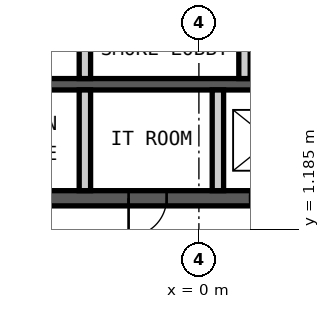
"""IFC4 building model, lengths in metres.
Left out: names, types, materials, properties, quantities, classifications, styles, units other than length and angle.
Written with IfcOpenShell. Run it as: python <this file> out.ifc"""

import sys

from ifc_helpers import new_model, si_unit, direction, frame, frame_2d, origin, place, context, subcontext, project, spatial, rectangle, extrude, element, fill, save


model = new_model("IFC4")
c1 = context("Model", 3, precision=1e-05, world=origin(), true_north=direction((0.0, 1.0)))
c2 = subcontext(c1, "Body", "Model", "MODEL_VIEW")
j1 = project(units=[si_unit("LENGTHUNIT", "METRE"), si_unit("PLANEANGLEUNIT", "RADIAN")], contexts=[c1])
p1 = place(None, origin())
s1 = spatial("IfcSite", under=j1, at=p1, CompositionType="ELEMENT")
p2 = place(p1, origin())
s2 = spatial("IfcBuilding", under=s1, at=p2, CompositionType="ELEMENT")
p3 = place(p2, frame((0.0, 0.0, 145.0)))
s3 = spatial("IfcBuildingStorey", under=s2, at=p3, CompositionType="ELEMENT", Elevation=145.0)
p4 = place(p3, frame((-12.0, 5.0, 0.0), z_axis=(0.0, 0.0, 1.0), x_axis=(1.0, 0.0, 0.0)))
e1 = element("IfcWall", 1, at=p4, inside=s3, PredefinedType="SHEAR", context=c2, shape_type="SweptSolid", body=[
    extrude(rectangle(XDim=24.0, YDim=0.3, at=frame_2d((12.0, 0.0))), origin(), (0.0, 0.0, 1.0), 4.2),
])
p5 = place(p3, frame((-12.0, 2.0, 0.0), z_axis=(0.0, 0.0, 1.0), x_axis=(1.0, 0.0, 0.0)))
e2 = element("IfcWall", 2, at=p5, inside=s3, PredefinedType="SHEAR", context=c2, shape_type="SweptSolid", body=[
    extrude(rectangle(XDim=24.0, YDim=0.4, at=frame_2d((12.0, 0.0))), origin(), (0.0, 0.0, 1.0), 4.2),
])
p6 = place(p5, frame((2.4, 0.0, 0.0)))
e3 = element("IfcOpeningElement", 3, at=p6, cuts=e2, PredefinedType="OPENING", context=c2, shape_type="SweptSolid", body=[
    extrude(rectangle(XDim=1.1, YDim=2.1, at=frame_2d((0.55, 1.05))), frame((0.0, 0.21, 0.0), z_axis=(0.0, -1.0, 0.0), x_axis=(1.0, 0.0, 0.0)), (0.0, 0.0, 1.0), 0.42),
])
p7 = place(p5, frame((22.0, 0.0, 0.0)))
e4 = element("IfcOpeningElement", 4, at=p7, cuts=e2, PredefinedType="OPENING", context=c2, shape_type="SweptSolid", body=[
    extrude(rectangle(XDim=1.1, YDim=2.1, at=frame_2d((0.55, 1.05))), frame((0.0, 0.21, 0.0), z_axis=(0.0, -1.0, 0.0), x_axis=(1.0, 0.0, 0.0)), (0.0, 0.0, 1.0), 0.42),
])
p8 = place(p5, frame((10.15, 0.0, 0.0)))
e5 = element("IfcOpeningElement", 5, at=p8, cuts=e2, PredefinedType="OPENING", context=c2, shape_type="SweptSolid", body=[
    extrude(rectangle(XDim=1.0, YDim=2.1, at=frame_2d((0.5, 1.05))), frame((0.0, 0.21, 0.0), z_axis=(0.0, -1.0, 0.0), x_axis=(1.0, 0.0, 0.0)), (0.0, 0.0, 1.0), 0.42),
])
p9 = place(p5, frame((6.9, 0.0, 0.0)))
e6 = element("IfcOpeningElement", 6, at=p9, cuts=e2, PredefinedType="OPENING", context=c2, shape_type="SweptSolid", body=[
    extrude(rectangle(XDim=1.0, YDim=2.1, at=frame_2d((0.5, 1.05))), frame((0.0, 0.21, 0.0), z_axis=(0.0, -1.0, 0.0), x_axis=(1.0, 0.0, 0.0)), (0.0, 0.0, 1.0), 0.42),
])
p10 = place(p5, frame((13.35, 0.0, 0.0)))
e7 = element("IfcOpeningElement", 7, at=p10, cuts=e2, PredefinedType="OPENING", context=c2, shape_type="SweptSolid", body=[
    extrude(rectangle(XDim=1.1, YDim=2.4, at=frame_2d((0.55, 1.2))), frame((0.0, 0.21, 0.0), z_axis=(0.0, -1.0, 0.0), x_axis=(1.0, 0.0, 0.0)), (0.0, 0.0, 1.0), 0.42),
])
p11 = place(p5, frame((16.15, 0.0, 0.0)))
e8 = element("IfcOpeningElement", 8, at=p11, cuts=e2, PredefinedType="OPENING", context=c2, shape_type="SweptSolid", body=[
    extrude(rectangle(XDim=1.1, YDim=2.4, at=frame_2d((0.55, 1.2))), frame((0.0, 0.21, 0.0), z_axis=(0.0, -1.0, 0.0), x_axis=(1.0, 0.0, 0.0)), (0.0, 0.0, 1.0), 0.42),
])
p12 = place(p5, frame((18.95, 0.0, 0.0)))
e9 = element("IfcOpeningElement", 9, at=p12, cuts=e2, PredefinedType="OPENING", context=c2, shape_type="SweptSolid", body=[
    extrude(rectangle(XDim=1.1, YDim=2.4, at=frame_2d((0.55, 1.2))), frame((0.0, 0.21, 0.0), z_axis=(0.0, -1.0, 0.0), x_axis=(1.0, 0.0, 0.0)), (0.0, 0.0, 1.0), 0.42),
])
p13 = place(p3, frame((-3.0, 5.15, 0.0), z_axis=(0.0, 0.0, 1.0), x_axis=(0.0, 1.0, 0.0)))
e10 = element("IfcWall", 10, at=p13, inside=s3, PredefinedType="PARTITIONING", context=c2, shape_type="SweptSolid", body=[
    extrude(rectangle(XDim=3.85, YDim=0.3, at=frame_2d((1.925, 0.0))), origin(), (0.0, 0.0, 1.0), 3.98),
])
p14 = place(p13, frame((1.425, 0.0, 0.0)))
e11 = element("IfcOpeningElement", 11, at=p14, cuts=e10, PredefinedType="OPENING", context=c2, shape_type="SweptSolid", body=[
    extrude(rectangle(XDim=1.0, YDim=2.1, at=frame_2d((0.5, 1.05))), frame((0.0, 0.16, 0.0), z_axis=(0.0, -1.0, 0.0), x_axis=(1.0, 0.0, 0.0)), (0.0, 0.0, 1.0), 0.32),
])
p15 = place(p3, frame((1.2, 5.15, 0.0), z_axis=(0.0, 0.0, 1.0), x_axis=(0.0, 1.0, 0.0)))
e12 = element("IfcWall", 12, at=p15, inside=s3, PredefinedType="PARTITIONING", context=c2, shape_type="SweptSolid", body=[
    extrude(rectangle(XDim=3.85, YDim=0.3, at=frame_2d((1.925, 0.0))), origin(), (0.0, 0.0, 1.0), 3.98),
])
p16 = place(p15, frame((1.375, 0.0, 0.0)))
e13 = element("IfcOpeningElement", 13, at=p16, cuts=e12, PredefinedType="OPENING", context=c2, shape_type="SweptSolid", body=[
    extrude(rectangle(XDim=1.1, YDim=2.4, at=frame_2d((0.55, 1.2))), frame((0.0, 0.16, 0.0), z_axis=(0.0, -1.0, 0.0), x_axis=(1.0, 0.0, 0.0)), (0.0, 0.0, 1.0), 0.32),
])
for number, where, z_axis, x_axis in (
    (14, (-3.0, 2.2, 0.0), (0.0, 0.0, 1.0), (0.0, 1.0, 0.0)),
    (15, (0.5, 2.2, 0.0), (0.0, 0.0, 1.0), (0.0, 1.0, 0.0)),
):
    element("IfcWall", number, at=place(p3, frame(where, z_axis=z_axis, x_axis=x_axis)), inside=s3, PredefinedType="PARTITIONING", context=c2, shape_type="SweptSolid", body=[
        extrude(rectangle(XDim=2.65, YDim=0.3, at=frame_2d((1.325, 0.0))), origin(), (0.0, 0.0, 1.0), 3.98),
    ])
p17 = place(p8, origin())
e16 = element("IfcDoor", 16, at=p17, inside=s3, OperationType="SINGLE_SWING_LEFT", PredefinedType="DOOR", context=c2, shape_type="SweptSolid", body=[
    extrude(rectangle(XDim=1.0, YDim=2.1, at=frame_2d((0.5, 1.05))), frame((0.0, 0.025, 0.0), z_axis=(0.0, -1.0, 0.0), x_axis=(1.0, 0.0, 0.0)), (0.0, 0.0, 1.0), 0.05),
])
fill(e5, e16)
save(model, sys.argv[1])
